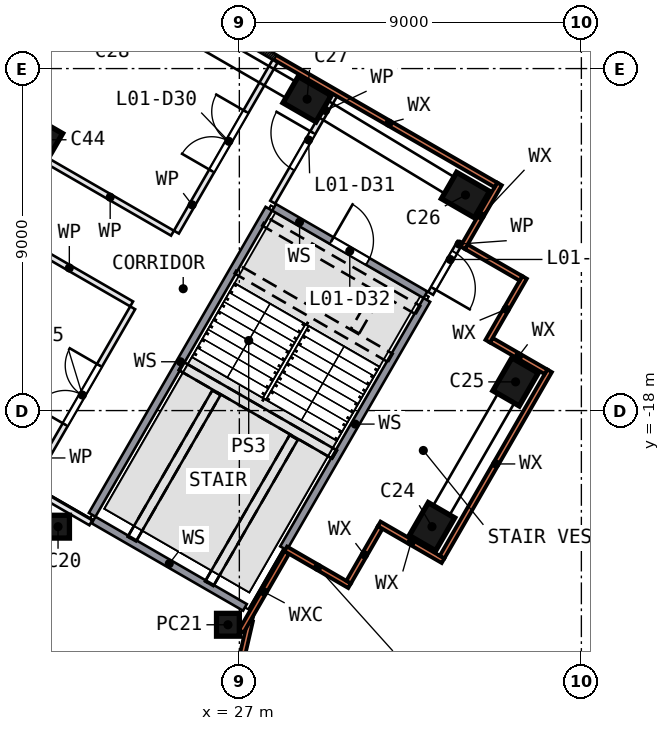
"""IFC4 building model, lengths in metres.
Left out: names, types, materials, properties, quantities, classifications, styles, units other than length and angle.
Written with IfcOpenShell. Run it as: python <this file> out.ifc"""

import sys

from ifc_helpers import new_model, si_unit, direction, frame, frame_2d, origin, origin_2d, place, context, subcontext, project, spatial, rectangle, extrude, element, fill, save


model = new_model("IFC4")
c1 = context("Model", 3, precision=1e-05, world=origin(), true_north=direction((0.0, 1.0)))
c2 = subcontext(c1, "Body", "Model", "MODEL_VIEW")
j1 = project(units=[si_unit("LENGTHUNIT", "METRE"), si_unit("PLANEANGLEUNIT", "RADIAN")], contexts=[c1])
p1 = place(None, origin())
s1 = spatial("IfcSite", under=j1, at=p1, CompositionType="ELEMENT")
p2 = place(p1, origin())
s2 = spatial("IfcBuilding", under=s1, at=p2, CompositionType="ELEMENT")
p3 = place(p2, frame((0.0, 0.0, 8.0)))
s3 = spatial("IfcBuildingStorey", under=s2, at=p3, CompositionType="ELEMENT", Elevation=8.0)
for number, where, z_axis, x_axis in (
    (1, (32.069, -21.055, 0.0), (0.0, 0.0, 1.0), (0.5, 0.866, 0.0)),
    (2, (34.269, -17.245, 0.0), (0.0, 0.0, 1.0), (0.5, 0.866, 0.0)),
    (3, (32.951, -12.327, 0.0), (0.0, 0.0, 1.0), (-0.866, 0.5, 0.0)),
    (4, (28.783, -9.805, 0.0), (0.0, 0.0, 1.0), (-0.866, 0.5, 0.0)),
):
    element("IfcColumn", number, at=place(p3, frame(where, z_axis=z_axis, x_axis=x_axis)), inside=s3, PredefinedType="COLUMN", context=c2, shape_type="SweptSolid", body=[
        extrude(rectangle(XDim=1.0, YDim=0.8, at=origin_2d()), origin(), (0.0, 0.0, 1.0), 5.55),
    ])
p4 = place(p3, frame((21.733, -10.873, 0.0), z_axis=(0.0, 0.0, 1.0), x_axis=(0.866025404, -0.5, 0.0)))
e5 = element("IfcColumn", 5, at=p4, inside=s3, PredefinedType="COLUMN", context=c2, shape_type="SweptSolid", body=[
    extrude(rectangle(XDim=0.9, YDim=0.9, at=origin_2d()), origin(), (0.0, 0.0, 1.0), 5.55),
])
for number, where, z_axis, x_axis in (
    (6, (22.229, -21.055, 0.0), (0.0, 0.0, 1.0), (0.0, -1.0, 0.0)),
    (7, (26.7, -23.637, 0.0), (0.0, 0.0, 1.0), (0.0, -1.0, 0.0)),
):
    element("IfcColumn", number, at=place(p3, frame(where, z_axis=z_axis, x_axis=x_axis)), inside=s3, PredefinedType="COLUMN", context=c2, shape_type="SweptSolid", body=[
        extrude(rectangle(XDim=0.6, YDim=0.6, at=origin_2d()), origin(), (0.0, 0.0, 1.0), 6.0),
    ])
p5 = place(p3, frame((23.96, -37.929, 0.0), z_axis=(0.0, 0.0, 1.0), x_axis=(0.22528195, 0.974293612, 0.0)))
e8 = element("IfcWall", 8, at=p5, inside=s3, PredefinedType="SOLIDWALL", context=c2, shape_type="SweptSolid", body=[
    extrude(rectangle(XDim=14.772, YDim=0.14, at=frame_2d((7.386, 0.0))), origin(), (0.0, 0.0, 1.0), 5.55),
])
p6 = place(p5, frame((1.322, 0.0, 0.9)))
e9 = element("IfcOpeningElement", 9, at=p6, cuts=e8, PredefinedType="OPENING", context=c2, shape_type="SweptSolid", body=[
    extrude(rectangle(XDim=3.6, YDim=3.6, at=frame_2d((1.8, 1.8))), frame((0.0, 0.08, 0.0), z_axis=(0.0, -1.0, 0.0), x_axis=(1.0, 0.0, 0.0)), (0.0, 0.0, 1.0), 0.16),
])
p7 = place(p5, frame((8.212, 0.0, 0.9)))
e10 = element("IfcOpeningElement", 10, at=p7, cuts=e8, PredefinedType="OPENING", context=c2, shape_type="SweptSolid", body=[
    extrude(rectangle(XDim=4.2, YDim=3.6, at=frame_2d((2.1, 1.8))), frame((0.0, 0.08, 0.0), z_axis=(0.0, -1.0, 0.0), x_axis=(1.0, 0.0, 0.0)), (0.0, 0.0, 1.0), 0.16),
])
p8 = place(p3, frame((27.051, -23.807, 0.0), z_axis=(0.0, 0.0, 1.0), x_axis=(0.499969813, 0.866042832, 0.0)))
e11 = element("IfcWall", 11, at=p8, inside=s3, PredefinedType="SOLIDWALL", context=c2, shape_type="SweptSolid", body=[
    extrude(rectangle(XDim=2.392, YDim=0.14, at=frame_2d((1.196, 0.0))), origin(), (0.0, 0.0, 1.0), 5.55),
])
p9 = place(p3, frame((28.221, -21.64, 0.0), z_axis=(0.0, 0.0, 1.0), x_axis=(0.866011627, -0.500023862, 0.0)))
e12 = element("IfcWall", 12, at=p9, inside=s3, PredefinedType="SOLIDWALL", context=c2, shape_type="SweptSolid", body=[
    extrude(rectangle(XDim=1.94, YDim=0.14, at=frame_2d((0.97, 0.0))), origin(), (0.0, 0.0, 1.0), 5.55),
])
p10 = place(p3, frame((29.875, -22.514, 0.0), z_axis=(0.0, 0.0, 1.0), x_axis=(0.499998264, 0.866026406, 0.0)))
e13 = element("IfcWall", 13, at=p10, inside=s3, PredefinedType="SOLIDWALL", context=c2, shape_type="SweptSolid", body=[
    extrude(rectangle(XDim=1.66, YDim=0.14, at=frame_2d((0.83, 0.0))), origin(), (0.0, 0.0, 1.0), 5.55),
])
p11 = place(p3, frame((30.68, -20.981, 0.0), z_axis=(0.0, 0.0, 1.0), x_axis=(0.866043088, -0.499969368, 0.0)))
e14 = element("IfcWall", 14, at=p11, inside=s3, PredefinedType="SOLIDWALL", context=c2, shape_type="SweptSolid", body=[
    extrude(rectangle(XDim=1.94, YDim=0.14, at=frame_2d((0.97, 0.0))), origin(), (0.0, 0.0, 1.0), 5.55),
])
p12 = place(p3, frame((32.334, -21.855, 0.0), z_axis=(0.0, 0.0, 1.0), x_axis=(0.499985074, 0.866034021, 0.0)))
e15 = element("IfcWall", 15, at=p12, inside=s3, PredefinedType="SOLIDWALL", context=c2, shape_type="SweptSolid", body=[
    extrude(rectangle(XDim=5.66, YDim=0.14, at=frame_2d((2.83, 0.0))), origin(), (0.0, 0.0, 1.0), 5.55),
])
p13 = place(p3, frame((35.069, -16.979, 0.0), z_axis=(0.0, 0.0, 1.0), x_axis=(-0.866053324, 0.499951638, 0.0)))
e16 = element("IfcWall", 16, at=p13, inside=s3, PredefinedType="SOLIDWALL", context=c2, shape_type="SweptSolid", body=[
    extrude(rectangle(XDim=1.66, YDim=0.14, at=frame_2d((0.83, 0.0))), origin(), (0.0, 0.0, 1.0), 5.55),
])
p14 = place(p3, frame((33.535, -16.175, 0.0), z_axis=(0.0, 0.0, 1.0), x_axis=(0.500063744, 0.865988598, 0.0)))
e17 = element("IfcWall", 17, at=p14, inside=s3, PredefinedType="SOLIDWALL", context=c2, shape_type="SweptSolid", body=[
    extrude(rectangle(XDim=1.94, YDim=0.14, at=frame_2d((0.97, 0.0))), origin(), (0.0, 0.0, 1.0), 5.55),
])
p15 = place(p3, frame((34.41, -14.52, 0.0), z_axis=(0.0, 0.0, 1.0), x_axis=(-0.865989634, 0.500061949, 0.0)))
e18 = element("IfcWall", 18, at=p15, inside=s3, PredefinedType="SOLIDWALL", context=c2, shape_type="SweptSolid", body=[
    extrude(rectangle(XDim=1.66, YDim=0.14, at=frame_2d((0.83, 0.0))), origin(), (0.0, 0.0, 1.0), 5.55),
])
p16 = place(p3, frame((32.877, -13.716, 0.0), z_axis=(0.0, 0.0, 1.0), x_axis=(0.500023862, 0.866011627, 0.0)))
e19 = element("IfcWall", 19, at=p16, inside=s3, PredefinedType="SOLIDWALL", context=c2, shape_type="SweptSolid", body=[
    extrude(rectangle(XDim=1.94, YDim=0.14, at=frame_2d((0.97, 0.0))), origin(), (0.0, 0.0, 1.0), 5.55),
])
p17 = place(p3, frame((33.751, -12.062, 0.0), z_axis=(0.0, 0.0, 1.0), x_axis=(-0.86602647, 0.499998154, 0.0)))
e20 = element("IfcWall", 20, at=p17, inside=s3, PredefinedType="SOLIDWALL", context=c2, shape_type="SweptSolid", body=[
    extrude(rectangle(XDim=10.961, YDim=0.14, at=frame_2d((5.481, 0.0))), origin(), (0.0, 0.0, 1.0), 5.55),
])
p18 = place(p17, frame((6.702, 0.0, 0.9)))
e21 = element("IfcOpeningElement", 21, at=p18, cuts=e20, PredefinedType="OPENING", context=c2, shape_type="SweptSolid", body=[
    extrude(rectangle(XDim=3.0, YDim=3.6, at=frame_2d((1.5, 1.8))), frame((0.0, 0.08, 0.0), z_axis=(0.0, -1.0, 0.0), x_axis=(1.0, 0.0, 0.0)), (0.0, 0.0, 1.0), 0.16),
])
p19 = place(p3, frame((20.886, -13.3, 0.0), z_axis=(0.0, 0.0, 1.0), x_axis=(0.866012734, -0.500021944, 0.0)))
e22 = element("IfcWall", 22, at=p19, inside=s3, PredefinedType="PARTITIONING", context=c2, shape_type="SweptSolid", body=[
    extrude(rectangle(XDim=3.787, YDim=0.15, at=frame_2d((1.894, 0.0))), origin(), (0.0, 0.0, 1.0), 5.55),
])
p20 = place(p3, frame((20.649, -10.594, 0.0), z_axis=(0.0, 0.0, 1.0), x_axis=(0.499987837, 0.866032426, 0.0)))
e23 = element("IfcWall", 23, at=p20, inside=s3, PredefinedType="PARTITIONING", context=c2, shape_type="SweptSolid", body=[
    extrude(rectangle(XDim=4.619, YDim=0.15, at=frame_2d((2.309, 0.0))), origin(), (0.0, 0.0, 1.0), 5.55),
])
p21 = place(p3, frame((21.533, -20.053, 0.0), z_axis=(0.0, 0.0, 1.0), x_axis=(0.865989076, -0.500062917, 0.0)))
e24 = element("IfcWall", 24, at=p21, inside=s3, PredefinedType="PARTITIONING", context=c2, shape_type="SweptSolid", body=[
    extrude(rectangle(XDim=1.8, YDim=0.15, at=frame_2d((0.9, 0.0))), origin(), (0.0, 0.0, 1.0), 5.55),
])
p22 = place(p3, frame((23.164, -20.879, 0.0), z_axis=(0.0, 0.0, 1.0), x_axis=(0.866030039, -0.499991972, 0.0)))
e25 = element("IfcWall", 25, at=p22, inside=s3, PredefinedType="SOLIDWALL", context=c2, shape_type="SweptSolid", body=[
    extrude(rectangle(XDim=4.6, YDim=0.2, at=frame_2d((2.3, 0.0))), origin(), (0.0, 0.0, 1.0), 5.55),
])
p23 = place(p3, frame((21.506, -19.951, 0.0), z_axis=(0.0, 0.0, 1.0), x_axis=(0.500008168, 0.866020688, 0.0)))
e26 = element("IfcWall", 26, at=p23, inside=s3, PredefinedType="PARTITIONING", context=c2, shape_type="SweptSolid", body=[
    extrude(rectangle(XDim=5.375, YDim=0.15, at=frame_2d((2.688, 0.0))), origin(), (0.0, 0.0, 1.0), 5.55),
])
p24 = place(p23, frame((1.825, 0.0, 0.0)))
e27 = element("IfcOpeningElement", 27, at=p24, cuts=e26, PredefinedType="OPENING", context=c2, shape_type="SweptSolid", body=[
    extrude(rectangle(XDim=1.8, YDim=2.1, at=frame_2d((0.9, 1.05))), frame((0.0, 0.085, 0.0), z_axis=(0.0, -1.0, 0.0), x_axis=(1.0, 0.0, 0.0)), (0.0, 0.0, 1.0), 0.17),
])
p25 = place(p3, frame((25.241, -13.332, 0.0), z_axis=(0.0, 0.0, 1.0), x_axis=(-0.866040651, 0.499973591, 0.0)))
e28 = element("IfcWall", 28, at=p25, inside=s3, PredefinedType="PARTITIONING", context=c2, shape_type="SweptSolid", body=[
    extrude(rectangle(XDim=3.787, YDim=0.15, at=frame_2d((1.894, 0.0))), origin(), (0.0, 0.0, 1.0), 5.55),
])
p26 = place(p3, frame((28.162, -21.623, 0.0), z_axis=(0.0, 0.0, 1.0), x_axis=(0.499981072, 0.866036332, 0.0)))
e29 = element("IfcWall", 29, at=p26, inside=s3, PredefinedType="SOLIDWALL", context=c2, shape_type="SweptSolid", body=[
    extrude(rectangle(XDim=7.545, YDim=0.2, at=frame_2d((3.772, 0.0))), origin(), (0.0, 0.0, 1.0), 5.55),
])
p27 = place(p3, frame((27.777, -12.688, 0.0), z_axis=(0.0, 0.0, 1.0), x_axis=(-0.500004225, -0.866022964, 0.0)))
e30 = element("IfcWall", 30, at=p27, inside=s3, PredefinedType="SOLIDWALL", context=c2, shape_type="SweptSolid", body=[
    extrude(rectangle(XDim=9.3, YDim=0.2, at=frame_2d((4.65, 0.0))), origin(), (0.0, 0.0, 1.0), 5.55),
])
p28 = place(p3, frame((25.343, -13.304, 0.0), z_axis=(0.0, 0.0, 1.0), x_axis=(0.499979347, 0.866037328, 0.0)))
e31 = element("IfcWall", 31, at=p28, inside=s3, PredefinedType="PARTITIONING", context=c2, shape_type="SweptSolid", body=[
    extrude(rectangle(XDim=5.21, YDim=0.15, at=frame_2d((2.605, 0.0))), origin(), (0.0, 0.0, 1.0), 5.55),
])
p29 = place(p28, frame((1.86, 0.0, 0.0)))
e32 = element("IfcOpeningElement", 32, at=p29, cuts=e31, PredefinedType="OPENING", context=c2, shape_type="SweptSolid", body=[
    extrude(rectangle(XDim=1.8, YDim=2.1, at=frame_2d((0.9, 1.05))), frame((0.0, 0.085, 0.0), z_axis=(0.0, -1.0, 0.0), x_axis=(1.0, 0.0, 0.0)), (0.0, 0.0, 1.0), 0.17),
])
p30 = place(p3, frame((27.877, -12.515, 0.0), z_axis=(0.0, 0.0, 1.0), x_axis=(0.499973122, 0.866040921, 0.0)))
e33 = element("IfcWall", 33, at=p30, inside=s3, PredefinedType="PARTITIONING", context=c2, shape_type="SweptSolid", body=[
    extrude(rectangle(XDim=3.26, YDim=0.15, at=frame_2d((1.63, 0.0))), origin(), (0.0, 0.0, 1.0), 5.55),
])
p31 = place(p30, frame((1.01, 0.0, 0.0)))
e34 = element("IfcOpeningElement", 34, at=p31, cuts=e33, PredefinedType="OPENING", context=c2, shape_type="SweptSolid", body=[
    extrude(rectangle(XDim=1.1, YDim=2.1, at=frame_2d((0.55, 1.05))), frame((0.0, 0.085, 0.0), z_axis=(0.0, -1.0, 0.0), x_axis=(1.0, 0.0, 0.0)), (0.0, 0.0, 1.0), 0.17),
])
p32 = place(p3, frame((27.914, -12.652, 0.0), z_axis=(0.0, 0.0, 1.0), x_axis=(0.86601677, -0.500014953, 0.0)))
e35 = element("IfcWall", 35, at=p32, inside=s3, PredefinedType="SOLIDWALL", context=c2, shape_type="SweptSolid", body=[
    extrude(rectangle(XDim=4.6, YDim=0.2, at=frame_2d((2.3, 0.0))), origin(), (0.0, 0.0, 1.0), 5.55),
])
p33 = place(p32, frame((1.75, 0.0, 0.0)))
e36 = element("IfcOpeningElement", 36, at=p33, cuts=e35, PredefinedType="OPENING", context=c2, shape_type="SweptSolid", body=[
    extrude(rectangle(XDim=1.1, YDim=2.1, at=frame_2d((0.55, 1.05))), frame((0.0, 0.11, 0.0), z_axis=(0.0, -1.0, 0.0), x_axis=(1.0, 0.0, 0.0)), (0.0, 0.0, 1.0), 0.22),
])
p34 = place(p3, frame((32.807, -13.577, 0.0), z_axis=(0.0, 0.0, 1.0), x_axis=(-0.499995951, -0.866027742, 0.0)))
e37 = element("IfcWall", 37, at=p34, inside=s3, PredefinedType="PARTITIONING", context=c2, shape_type="SweptSolid", body=[
    extrude(rectangle(XDim=1.545, YDim=0.15, at=frame_2d((0.773, 0.0))), origin(), (0.0, 0.0, 1.0), 5.55),
])
p35 = place(p34, frame((0.295, 0.0, 0.0)))
e38 = element("IfcOpeningElement", 38, at=p35, cuts=e37, PredefinedType="OPENING", context=c2, shape_type="SweptSolid", body=[
    extrude(rectangle(XDim=1.1, YDim=2.1, at=frame_2d((0.55, 1.05))), frame((0.0, 0.085, 0.0), z_axis=(0.0, -1.0, 0.0), x_axis=(1.0, 0.0, 0.0)), (0.0, 0.0, 1.0), 0.17),
])
p36 = place(p18, origin())
e39 = element("IfcWindow", 39, at=p36, inside=s3, PartitioningType="SINGLE_PANEL", PredefinedType="WINDOW", context=c2, shape_type="SweptSolid", body=[
    extrude(rectangle(XDim=3.0, YDim=3.6, at=frame_2d((1.5, 1.8))), frame((0.0, 0.03, 0.0), z_axis=(0.0, -1.0, 0.0), x_axis=(1.0, 0.0, 0.0)), (0.0, 0.0, 1.0), 0.06),
])
fill(e21, e39)
p37 = place(p24, origin())
e40 = element("IfcDoor", 40, at=p37, inside=s3, OperationType="DOUBLE_DOOR_SINGLE_SWING", PredefinedType="DOOR", context=c2, shape_type="SweptSolid", body=[
    extrude(rectangle(XDim=1.8, YDim=2.1, at=frame_2d((0.9, 1.05))), frame((0.0, 0.025, 0.0), z_axis=(0.0, -1.0, 0.0), x_axis=(1.0, 0.0, 0.0)), (0.0, 0.0, 1.0), 0.05),
])
fill(e27, e40)
p38 = place(p29, origin())
e41 = element("IfcDoor", 41, at=p38, inside=s3, OperationType="DOUBLE_DOOR_SINGLE_SWING", PredefinedType="DOOR", context=c2, shape_type="SweptSolid", body=[
    extrude(rectangle(XDim=1.8, YDim=2.1, at=frame_2d((0.9, 1.05))), frame((0.0, 0.025, 0.0), z_axis=(0.0, -1.0, 0.0), x_axis=(1.0, 0.0, 0.0)), (0.0, 0.0, 1.0), 0.05),
])
fill(e32, e41)
p39 = place(p31, origin())
e42 = element("IfcDoor", 42, at=p39, inside=s3, OperationType="SINGLE_SWING_RIGHT", PredefinedType="DOOR", context=c2, shape_type="SweptSolid", body=[
    extrude(rectangle(XDim=1.1, YDim=2.1, at=frame_2d((0.55, 1.05))), frame((0.0, 0.025, 0.0), z_axis=(0.0, -1.0, 0.0), x_axis=(1.0, 0.0, 0.0)), (0.0, 0.0, 1.0), 0.05),
])
fill(e34, e42)
p40 = place(p33, origin())
e43 = element("IfcDoor", 43, at=p40, inside=s3, OperationType="SINGLE_SWING_LEFT", PredefinedType="DOOR", context=c2, shape_type="SweptSolid", body=[
    extrude(rectangle(XDim=1.1, YDim=2.1, at=frame_2d((0.55, 1.05))), frame((0.0, 0.025, 0.0), z_axis=(0.0, -1.0, 0.0), x_axis=(1.0, 0.0, 0.0)), (0.0, 0.0, 1.0), 0.05),
])
fill(e36, e43)
p41 = place(p35, origin())
e44 = element("IfcDoor", 44, at=p41, inside=s3, OperationType="SINGLE_SWING_RIGHT", PredefinedType="DOOR", context=c2, shape_type="SweptSolid", body=[
    extrude(rectangle(XDim=1.1, YDim=2.1, at=frame_2d((0.55, 1.05))), frame((0.0, 0.025, 0.0), z_axis=(0.0, -1.0, 0.0), x_axis=(1.0, 0.0, 0.0)), (0.0, 0.0, 1.0), 0.05),
])
fill(e38, e44)
save(model, sys.argv[1])
